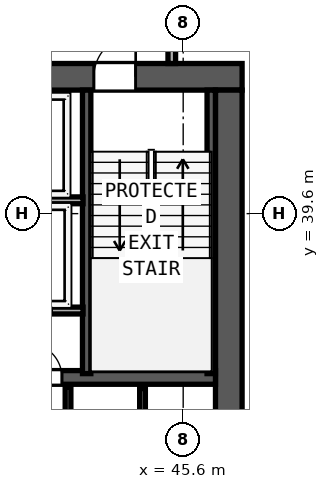
"""IFC4 building model, lengths in metres.
Left out: names, types, materials, properties, quantities, classifications, styles, units other than length and angle.
Written with IfcOpenShell. Run it as: python <this file> out.ifc"""

import sys

from ifc_helpers import new_model, si_unit, direction, frame, frame_2d, origin, place, context, subcontext, project, spatial, rectangle, extrude, element, fill, save


model = new_model("IFC4")
c1 = context("Model", 3, precision=1e-05, world=origin(), true_north=direction((0.0, 1.0)))
c2 = subcontext(c1, "Body", "Model", "MODEL_VIEW")
j1 = project(units=[si_unit("LENGTHUNIT", "METRE"), si_unit("PLANEANGLEUNIT", "RADIAN")], contexts=[c1])
p1 = place(None, origin())
s1 = spatial("IfcSite", under=j1, at=p1, CompositionType="ELEMENT")
p2 = place(p1, origin())
s2 = spatial("IfcBuilding", under=s1, at=p2, CompositionType="ELEMENT")
p3 = place(p2, frame((0.0, 0.0, 144.8)))
s3 = spatial("IfcBuildingStorey", under=s2, at=p3, CompositionType="ELEMENT", Elevation=144.8)
p4 = place(p3, frame((29.65, 43.2, 0.0), z_axis=(0.0, 0.0, 1.0), x_axis=(1.0, 0.0, 0.0)))
e1 = element("IfcWall", 1, at=p4, inside=s3, PredefinedType="SHEAR", context=c2, shape_type="SweptSolid", body=[
    extrude(rectangle(XDim=17.5, YDim=0.7, at=frame_2d((8.75, 0.0))), origin(), (0.0, 0.0, 1.0), 3.6),
])
p5 = place(p4, frame((2.4, 0.0, 0.0)))
e2 = element("IfcOpeningElement", 2, at=p5, cuts=e1, PredefinedType="OPENING", context=c2, shape_type="SweptSolid", body=[
    extrude(rectangle(XDim=1.1, YDim=2.15, at=frame_2d((0.55, 1.075))), frame((0.0, 0.36, 0.0), z_axis=(0.0, -1.0, 0.0), x_axis=(1.0, 0.0, 0.0)), (0.0, 0.0, 1.0), 0.72),
])
p6 = place(p4, frame((7.51, 0.0, 0.0)))
e3 = element("IfcOpeningElement", 3, at=p6, cuts=e1, PredefinedType="OPENING", context=c2, shape_type="SweptSolid", body=[
    extrude(rectangle(XDim=1.1, YDim=2.15, at=frame_2d((0.55, 1.075))), frame((0.0, 0.36, 0.0), z_axis=(0.0, -1.0, 0.0), x_axis=(1.0, 0.0, 0.0)), (0.0, 0.0, 1.0), 0.72),
])
p7 = place(p4, frame((13.6, 0.0, 0.0)))
e4 = element("IfcOpeningElement", 4, at=p7, cuts=e1, PredefinedType="OPENING", context=c2, shape_type="SweptSolid", body=[
    extrude(rectangle(XDim=1.1, YDim=2.15, at=frame_2d((0.55, 1.075))), frame((0.0, 0.36, 0.0), z_axis=(0.0, -1.0, 0.0), x_axis=(1.0, 0.0, 0.0)), (0.0, 0.0, 1.0), 0.72),
])
p8 = place(p4, frame((4.73, 0.0, 0.0)))
e5 = element("IfcOpeningElement", 5, at=p8, cuts=e1, PredefinedType="OPENING", context=c2, shape_type="SweptSolid", body=[
    extrude(rectangle(XDim=1.1, YDim=2.2, at=frame_2d((0.55, 1.1))), frame((0.0, 0.36, 0.0), z_axis=(0.0, -1.0, 0.0), x_axis=(1.0, 0.0, 0.0)), (0.0, 0.0, 1.0), 0.72),
])
p9 = place(p4, frame((11.09, 0.0, 0.0)))
e6 = element("IfcOpeningElement", 6, at=p9, cuts=e1, PredefinedType="OPENING", context=c2, shape_type="SweptSolid", body=[
    extrude(rectangle(XDim=1.1, YDim=2.2, at=frame_2d((0.55, 1.1))), frame((0.0, 0.36, 0.0), z_axis=(0.0, -1.0, 0.0), x_axis=(1.0, 0.0, 0.0)), (0.0, 0.0, 1.0), 0.72),
])
p10 = place(p3, frame((46.8, 32.8, 0.0), z_axis=(0.0, 0.0, 1.0), x_axis=(0.0, 1.0, 0.0)))
e7 = element("IfcWall", 7, at=p10, inside=s3, PredefinedType="SHEAR", context=c2, shape_type="SweptSolid", body=[
    extrude(rectangle(XDim=10.05, YDim=0.7, at=frame_2d((5.025, 0.0))), origin(), (0.0, 0.0, 1.0), 3.6),
])
p11 = place(p3, frame((30.35, 35.29, 0.0), z_axis=(0.0, 0.0, 1.0), x_axis=(1.0, 0.0, 0.0)))
e8 = element("IfcWall", 8, at=p11, inside=s3, PredefinedType="SHEAR", context=c2, shape_type="SweptSolid", body=[
    extrude(rectangle(XDim=16.1, YDim=0.36, at=frame_2d((8.05, 0.0))), origin(), (0.0, 0.0, 1.0), 3.6),
])
p12 = place(p11, frame((5.0, 0.0, 0.0), z_axis=(0.0, 0.0, 1.0), x_axis=(-1.0, 0.0, 0.0)))
e9 = element("IfcOpeningElement", 9, at=p12, cuts=e8, PredefinedType="OPENING", context=c2, shape_type="SweptSolid", body=[
    extrude(rectangle(XDim=0.9, YDim=2.1, at=frame_2d((0.45, 1.05))), frame((0.0, 0.19, 0.0), z_axis=(0.0, -1.0, 0.0), x_axis=(1.0, 0.0, 0.0)), (0.0, 0.0, 1.0), 0.38),
])
p13 = place(p11, frame((12.06, 0.0, 0.0), z_axis=(0.0, 0.0, 1.0), x_axis=(-1.0, 0.0, 0.0)))
e10 = element("IfcOpeningElement", 10, at=p13, cuts=e8, PredefinedType="OPENING", context=c2, shape_type="SweptSolid", body=[
    extrude(rectangle(XDim=0.9, YDim=2.1, at=frame_2d((0.45, 1.05))), frame((0.0, 0.19, 0.0), z_axis=(0.0, -1.0, 0.0), x_axis=(1.0, 0.0, 0.0)), (0.0, 0.0, 1.0), 0.38),
])
for number, where, z_axis, x_axis in (
    (11, (43.06, 35.39, 0.0), (0.0, 0.0, 1.0), (0.0, 1.0, 0.0)),
    (12, (46.338, 35.39, 0.0), (0.0, 0.0, 1.0), (0.0, 1.0, 0.0)),
):
    element("IfcWall", number, at=place(p3, frame(where, z_axis=z_axis, x_axis=x_axis)), inside=s3, PredefinedType="SHEAR", context=c2, shape_type="SweptSolid", body=[
        extrude(rectangle(XDim=7.46, YDim=0.22, at=frame_2d((3.73, 0.0))), origin(), (0.0, 0.0, 1.0), 3.6),
    ])
p14 = place(p3, frame((45.3, 43.55, 0.0), z_axis=(0.0, 0.0, 1.0), x_axis=(0.0, 1.0, 0.0)))
e13 = element("IfcWall", 13, at=p14, inside=s3, PredefinedType="SOLIDWALL", context=c2, shape_type="SweptSolid", body=[
    extrude(rectangle(XDim=2.885, YDim=0.2, at=frame_2d((1.442, 0.0))), origin(), (0.0, 0.0, 1.0), 3.6),
])
p15 = place(p14, frame((0.7, 0.0, 0.0)))
e14 = element("IfcOpeningElement", 14, at=p15, cuts=e13, PredefinedType="OPENING", context=c2, shape_type="SweptSolid", body=[
    extrude(rectangle(XDim=1.1, YDim=2.15, at=frame_2d((0.55, 1.075))), frame((0.0, 0.11, 0.0), z_axis=(0.0, -1.0, 0.0), x_axis=(1.0, 0.0, 0.0)), (0.0, 0.0, 1.0), 0.22),
])
p16 = place(p3, frame((40.195, 39.95, 0.0), z_axis=(0.0, 0.0, 1.0), x_axis=(1.0, 0.0, 0.0)))
e15 = element("IfcWall", 15, at=p16, inside=s3, PredefinedType="SOLIDWALL", context=c2, shape_type="SweptSolid", body=[
    extrude(rectangle(XDim=2.77, YDim=0.18, at=frame_2d((1.385, 0.0))), origin(), (0.0, 0.0, 1.0), 3.6),
])
p17 = place(p3, frame((40.195, 37.05, 0.0), z_axis=(0.0, 0.0, 1.0), x_axis=(1.0, 0.0, 0.0)))
e16 = element("IfcWall", 16, at=p17, inside=s3, PredefinedType="SOLIDWALL", context=c2, shape_type="SweptSolid", body=[
    extrude(rectangle(XDim=2.77, YDim=0.18, at=frame_2d((1.385, 0.0))), origin(), (0.0, 0.0, 1.0), 3.6),
])
p18 = place(p17, frame((1.945, 0.0, 0.0), z_axis=(0.0, 0.0, 1.0), x_axis=(-1.0, 0.0, 0.0)))
e17 = element("IfcOpeningElement", 17, at=p18, cuts=e16, PredefinedType="OPENING", context=c2, shape_type="SweptSolid", body=[
    extrude(rectangle(XDim=1.2, YDim=2.2, at=frame_2d((0.6, 1.1))), frame((0.0, 0.1, 0.0), z_axis=(0.0, -1.0, 0.0), x_axis=(1.0, 0.0, 0.0)), (0.0, 0.0, 1.0), 0.2),
])
p19 = place(p3, frame((42.57, 32.88, 0.0), z_axis=(0.0, 0.0, 1.0), x_axis=(0.0, 1.0, 0.0)))
e18 = element("IfcWall", 18, at=p19, inside=s3, PredefinedType="SOLIDWALL", context=c2, shape_type="SweptSolid", body=[
    extrude(rectangle(XDim=2.17, YDim=0.15, at=frame_2d((1.085, 0.0))), origin(), (0.0, 0.0, 1.0), 3.6),
])
p20 = place(p3, frame((44.53, 32.95, 0.0), z_axis=(0.0, 0.0, 1.0), x_axis=(0.0, 1.0, 0.0)))
e19 = element("IfcWall", 19, at=p20, inside=s3, PredefinedType="SOLIDWALL", context=c2, shape_type="SweptSolid", body=[
    extrude(rectangle(XDim=2.05, YDim=0.15, at=frame_2d((1.025, 0.0))), origin(), (0.0, 0.0, 1.0), 3.6),
])
p21 = place(p7, origin())
e20 = element("IfcDoor", 20, at=p21, inside=s3, OperationType="SINGLE_SWING_RIGHT", PredefinedType="DOOR", context=c2, shape_type="SweptSolid", body=[
    extrude(rectangle(XDim=1.1, YDim=2.15, at=frame_2d((0.55, 1.075))), frame((0.0, 0.185, 0.0), z_axis=(0.0, -1.0, 0.0), x_axis=(1.0, 0.0, 0.0)), (0.0, 0.0, 1.0), 0.05),
])
fill(e4, e20)
p22 = place(p13, origin())
e21 = element("IfcDoor", 21, at=p22, inside=s3, OperationType="SINGLE_SWING_RIGHT", PredefinedType="DOOR", context=c2, shape_type="SweptSolid", body=[
    extrude(rectangle(XDim=0.9, YDim=2.1, at=frame_2d((0.45, 1.05))), frame((0.0, 0.025, 0.0), z_axis=(0.0, -1.0, 0.0), x_axis=(1.0, 0.0, 0.0)), (0.0, 0.0, 1.0), 0.05),
])
fill(e10, e21)
save(model, sys.argv[1])
